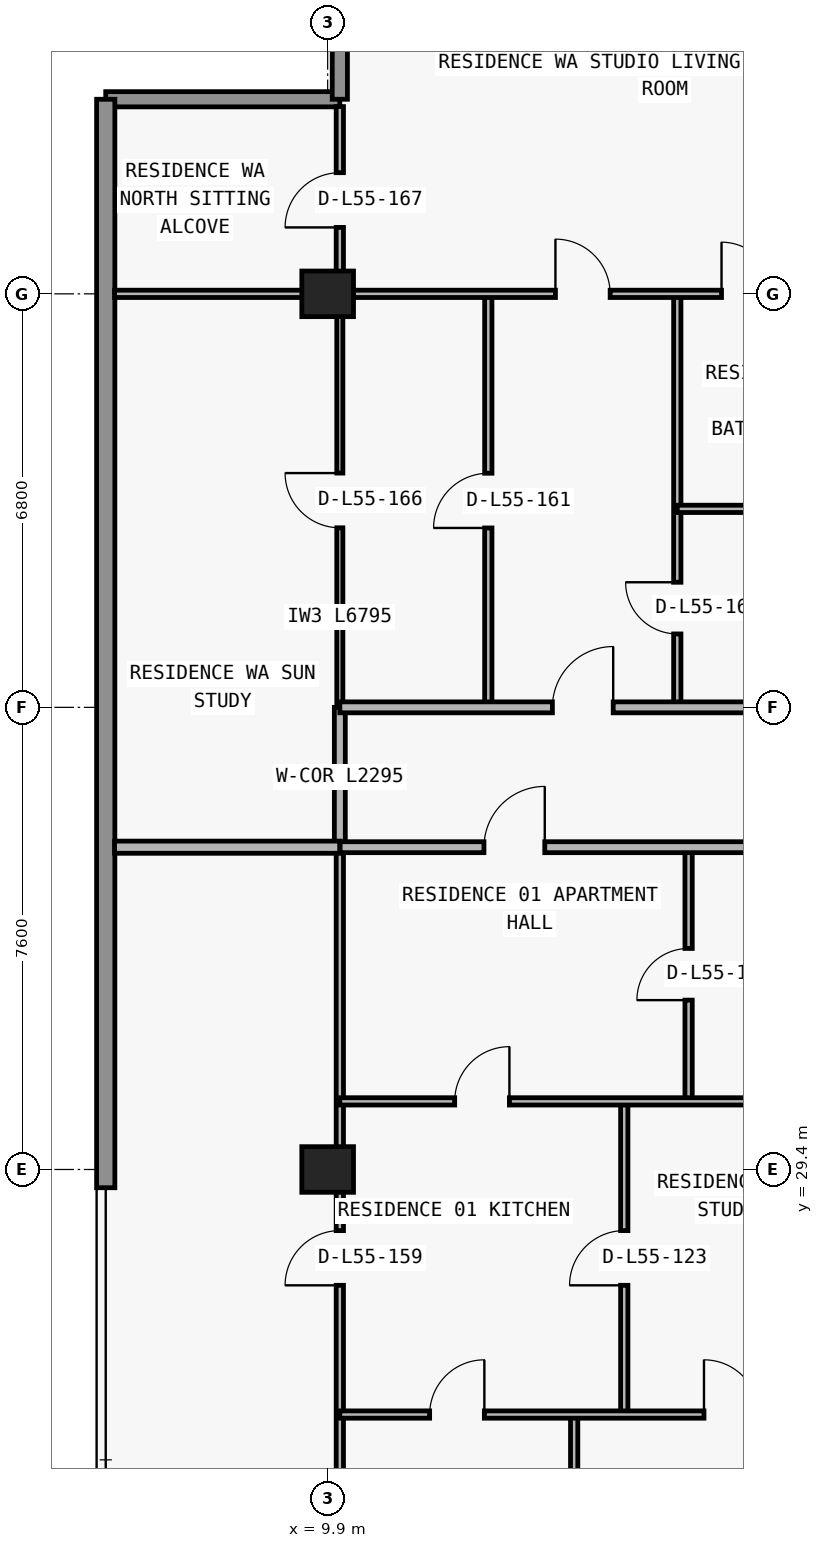
"""IFC4 building model, lengths in metres.
Left out: names, types, materials, properties, quantities, classifications, styles, units other than length and angle.
Written with IfcOpenShell. Run it as: python <this file> out.ifc"""

import sys

from ifc_helpers import new_model, si_unit, direction, frame, frame_2d, origin, origin_2d, place, context, subcontext, project, spatial, rectangle, extrude, element, fill, save


model = new_model("IFC4")
c1 = context("Model", 3, precision=1e-05, world=origin(), true_north=direction((0.0, 1.0)))
c2 = subcontext(c1, "Body", "Model", "MODEL_VIEW")
j1 = project(units=[si_unit("LENGTHUNIT", "METRE"), si_unit("PLANEANGLEUNIT", "RADIAN")], contexts=[c1])
p1 = place(None, origin())
s1 = spatial("IfcSite", under=j1, at=p1, CompositionType="ELEMENT")
p2 = place(p1, origin())
s2 = spatial("IfcBuilding", under=s1, at=p2, CompositionType="ELEMENT")
p3 = place(p2, frame((0.0, 0.0, 198.3)))
s3 = spatial("IfcBuildingStorey", under=s2, at=p3, CompositionType="ELEMENT", Elevation=198.3)
for number, where, z_axis, x_axis in (
    (1, (9.9, 29.4, 0.0), (0.0, 0.0, 1.0), (1.0, 0.0, 0.0)),
    (2, (9.9, 43.8, 0.0), (0.0, 0.0, 1.0), (1.0, 0.0, 0.0)),
):
    element("IfcColumn", number, at=place(p3, frame(where, z_axis=z_axis, x_axis=x_axis)), inside=s3, PredefinedType="COLUMN", context=c2, shape_type="SweptSolid", body=[
        extrude(rectangle(XDim=0.85, YDim=0.75, at=origin_2d()), origin(), (0.0, 0.0, 1.0), 3.05),
    ])
p4 = place(p3, frame((6.25, 47.0, 0.0), z_axis=(0.0, 0.0, 1.0), x_axis=(1.0, 0.0, 0.0)))
e3 = element("IfcWall", 3, at=p4, inside=s3, PredefinedType="ELEMENTEDWALL", context=c2, shape_type="SweptSolid", body=[
    extrude(rectangle(XDim=3.85, YDim=0.25, at=frame_2d((1.925, 0.0))), origin(), (0.0, 0.0, 1.0), 3.05),
])
p5 = place(p3, frame((10.1, 47.0, 0.0), z_axis=(0.0, 0.0, 1.0), x_axis=(0.0, 1.0, 0.0)))
e4 = element("IfcWall", 4, at=p5, inside=s3, PredefinedType="ELEMENTEDWALL", context=c2, shape_type="SweptSolid", body=[
    extrude(rectangle(XDim=3.45, YDim=0.25, at=frame_2d((1.725, 0.0))), origin(), (0.0, 0.0, 1.0), 3.05),
])
p6 = place(p3, frame((6.25, 29.1, 0.0), z_axis=(0.0, 0.0, 1.0), x_axis=(0.0, 1.0, 0.0)))
e5 = element("IfcWall", 5, at=p6, inside=s3, PredefinedType="STANDARD", context=c2, shape_type="SweptSolid", body=[
    extrude(rectangle(XDim=17.9, YDim=0.3, at=frame_2d((8.95, 0.0))), origin(), (0.0, 0.0, 1.0), 3.05),
])
p7 = place(p3, frame((10.1, 11.285, 0.0), z_axis=(0.0, 0.0, 1.0), x_axis=(0.0, 1.0, 0.0)))
e6 = element("IfcWall", 6, at=p7, inside=s3, PredefinedType="PARTITIONING", context=c2, shape_type="SweptSolid", body=[
    extrude(rectangle(XDim=23.415, YDim=0.12, at=frame_2d((11.708, 0.0))), origin(), (0.0, 0.0, 1.0), 2.263),
])
p8 = place(p7, frame((16.21, 0.0, 0.0)))
e7 = element("IfcOpeningElement", 7, at=p8, cuts=e6, PredefinedType="OPENING", context=c2, shape_type="SweptSolid", body=[
    extrude(rectangle(XDim=0.9, YDim=2.15, at=frame_2d((0.45, 1.075))), frame((0.0, 0.07, 0.0), z_axis=(0.0, -1.0, 0.0), x_axis=(1.0, 0.0, 0.0)), (0.0, 0.0, 1.0), 0.14),
])
p9 = place(p3, frame((10.1, 34.705, 0.0), z_axis=(0.0, 0.0, 1.0), x_axis=(0.0, 1.0, 0.0)))
e8 = element("IfcWall", 8, at=p9, inside=s3, PredefinedType="PARTITIONING", context=c2, shape_type="SweptSolid", body=[
    extrude(rectangle(XDim=2.295, YDim=0.18, at=frame_2d((1.147, 0.0))), origin(), (0.0, 0.0, 1.0), 2.263),
])
p10 = place(p3, frame((10.1, 37.005, 0.0), z_axis=(0.0, 0.0, 1.0), x_axis=(0.0, 1.0, 0.0)))
e9 = element("IfcWall", 9, at=p10, inside=s3, PredefinedType="MOVABLE", context=c2, shape_type="SweptSolid", body=[
    extrude(rectangle(XDim=6.795, YDim=0.1, at=frame_2d((3.397, 0.0))), origin(), (0.0, 0.0, 1.0), 2.263),
])
p11 = place(p10, frame((2.948, 0.0, 0.0)))
e10 = element("IfcOpeningElement", 10, at=p11, cuts=e9, PredefinedType="OPENING", context=c2, shape_type="SweptSolid", body=[
    extrude(rectangle(XDim=0.9, YDim=2.15, at=frame_2d((0.45, 1.075))), frame((0.0, 0.06, 0.0), z_axis=(0.0, -1.0, 0.0), x_axis=(1.0, 0.0, 0.0)), (0.0, 0.0, 1.0), 0.12),
])
p12 = place(p3, frame((10.1, 43.805, 0.0), z_axis=(0.0, 0.0, 1.0), x_axis=(0.0, 1.0, 0.0)))
e11 = element("IfcWall", 11, at=p12, inside=s3, PredefinedType="PARTITIONING", context=c2, shape_type="SweptSolid", body=[
    extrude(rectangle(XDim=3.075, YDim=0.12, at=frame_2d((1.538, 0.0))), origin(), (0.0, 0.0, 1.0), 3.05),
])
p13 = place(p12, frame((1.087, 0.0, 0.0)))
e12 = element("IfcOpeningElement", 12, at=p13, cuts=e11, PredefinedType="OPENING", context=c2, shape_type="SweptSolid", body=[
    extrude(rectangle(XDim=0.9, YDim=2.15, at=frame_2d((0.45, 1.075))), frame((0.0, 0.07, 0.0), z_axis=(0.0, -1.0, 0.0), x_axis=(1.0, 0.0, 0.0)), (0.0, 0.0, 1.0), 0.14),
])
p14 = place(p3, frame((12.542, 37.0, 0.0), z_axis=(0.0, 0.0, 1.0), x_axis=(0.0, 1.0, 0.0)))
e13 = element("IfcWall", 13, at=p14, inside=s3, PredefinedType="PARTITIONING", context=c2, shape_type="SweptSolid", body=[
    extrude(rectangle(XDim=6.8, YDim=0.12, at=frame_2d((3.4, 0.0))), origin(), (0.0, 0.0, 1.0), 3.05),
])
p15 = place(p14, frame((2.95, 0.0, 0.0)))
e14 = element("IfcOpeningElement", 14, at=p15, cuts=e13, PredefinedType="OPENING", context=c2, shape_type="SweptSolid", body=[
    extrude(rectangle(XDim=0.9, YDim=2.15, at=frame_2d((0.45, 1.075))), frame((0.0, 0.07, 0.0), z_axis=(0.0, -1.0, 0.0), x_axis=(1.0, 0.0, 0.0)), (0.0, 0.0, 1.0), 0.14),
])
p16 = place(p3, frame((13.954, 11.24, 0.0), z_axis=(0.0, 0.0, 1.0), x_axis=(0.0, 1.0, 0.0)))
e15 = element("IfcWall", 15, at=p16, inside=s3, PredefinedType="PARTITIONING", context=c2, shape_type="SweptSolid", body=[
    extrude(rectangle(XDim=14.13, YDim=0.12, at=frame_2d((7.065, 0.0))), origin(), (0.0, 0.0, 1.0), 2.725),
])
p17 = place(p3, frame((14.778, 25.37, 0.0), z_axis=(0.0, 0.0, 1.0), x_axis=(0.0, 1.0, 0.0)))
e16 = element("IfcWall", 16, at=p17, inside=s3, PredefinedType="PARTITIONING", context=c2, shape_type="SweptSolid", body=[
    extrude(rectangle(XDim=5.15, YDim=0.12, at=frame_2d((2.575, 0.0))), origin(), (0.0, 0.0, 1.0), 3.05),
])
p18 = place(p17, frame((2.125, 0.0, 0.0)))
e17 = element("IfcOpeningElement", 17, at=p18, cuts=e16, PredefinedType="OPENING", context=c2, shape_type="SweptSolid", body=[
    extrude(rectangle(XDim=0.9, YDim=2.15, at=frame_2d((0.45, 1.075))), frame((0.0, 0.07, 0.0), z_axis=(0.0, -1.0, 0.0), x_axis=(1.0, 0.0, 0.0)), (0.0, 0.0, 1.0), 0.14),
])
p19 = place(p3, frame((15.65, 37.0, 0.0), z_axis=(0.0, 0.0, 1.0), x_axis=(0.0, 1.0, 0.0)))
e18 = element("IfcWall", 18, at=p19, inside=s3, PredefinedType="PARTITIONING", context=c2, shape_type="SweptSolid", body=[
    extrude(rectangle(XDim=6.8, YDim=0.12, at=frame_2d((3.4, 0.0))), origin(), (0.0, 0.0, 1.0), 3.05),
])
p20 = place(p19, frame((1.207, 0.0, 0.0)))
e19 = element("IfcOpeningElement", 19, at=p20, cuts=e18, PredefinedType="OPENING", context=c2, shape_type="SweptSolid", body=[
    extrude(rectangle(XDim=0.85, YDim=2.1, at=frame_2d((0.425, 1.05))), frame((0.0, 0.07, 0.0), z_axis=(0.0, -1.0, 0.0), x_axis=(1.0, 0.0, 0.0)), (0.0, 0.0, 1.0), 0.14),
])
p21 = place(p3, frame((15.836, 30.52, 0.0), z_axis=(0.0, 0.0, 1.0), x_axis=(0.0, 1.0, 0.0)))
e20 = element("IfcWall", 20, at=p21, inside=s3, PredefinedType="PARTITIONING", context=c2, shape_type="SweptSolid", body=[
    extrude(rectangle(XDim=4.18, YDim=0.12, at=frame_2d((2.09, 0.0))), origin(), (0.0, 0.0, 1.0), 3.05),
])
p22 = place(p21, frame((1.665, 0.0, 0.0)))
e21 = element("IfcOpeningElement", 21, at=p22, cuts=e20, PredefinedType="OPENING", context=c2, shape_type="SweptSolid", body=[
    extrude(rectangle(XDim=0.85, YDim=2.1, at=frame_2d((0.425, 1.05))), frame((0.0, 0.07, 0.0), z_axis=(0.0, -1.0, 0.0), x_axis=(1.0, 0.0, 0.0)), (0.0, 0.0, 1.0), 0.14),
])
p23 = place(p3, frame((10.1, 25.37, 0.0), z_axis=(0.0, 0.0, 1.0), x_axis=(1.0, 0.0, 0.0)))
e22 = element("IfcWall", 22, at=p23, inside=s3, PredefinedType="PARTITIONING", context=c2, shape_type="SweptSolid", body=[
    extrude(rectangle(XDim=8.2, YDim=0.12, at=frame_2d((4.1, 0.0))), origin(), (0.0, 0.0, 1.0), 3.05),
])
p24 = place(p23, frame((1.477, 0.0, 0.0)))
e23 = element("IfcOpeningElement", 23, at=p24, cuts=e22, PredefinedType="OPENING", context=c2, shape_type="SweptSolid", body=[
    extrude(rectangle(XDim=0.9, YDim=2.15, at=frame_2d((0.45, 1.075))), frame((0.0, 0.07, 0.0), z_axis=(0.0, -1.0, 0.0), x_axis=(1.0, 0.0, 0.0)), (0.0, 0.0, 1.0), 0.14),
])
p25 = place(p23, frame((5.989, 0.0, 0.0)))
e24 = element("IfcOpeningElement", 24, at=p25, cuts=e22, PredefinedType="OPENING", context=c2, shape_type="SweptSolid", body=[
    extrude(rectangle(XDim=0.9, YDim=2.15, at=frame_2d((0.45, 1.075))), frame((0.0, 0.07, 0.0), z_axis=(0.0, -1.0, 0.0), x_axis=(1.0, 0.0, 0.0)), (0.0, 0.0, 1.0), 0.14),
])
p26 = place(p3, frame((10.1, 30.52, 0.0), z_axis=(0.0, 0.0, 1.0), x_axis=(1.0, 0.0, 0.0)))
e25 = element("IfcWall", 25, at=p26, inside=s3, PredefinedType="PARTITIONING", context=c2, shape_type="SweptSolid", body=[
    extrude(rectangle(XDim=8.2, YDim=0.12, at=frame_2d((4.1, 0.0))), origin(), (0.0, 0.0, 1.0), 3.05),
])
p27 = place(p26, frame((1.889, 0.0, 0.0)))
e26 = element("IfcOpeningElement", 26, at=p27, cuts=e25, PredefinedType="OPENING", context=c2, shape_type="SweptSolid", body=[
    extrude(rectangle(XDim=0.9, YDim=2.15, at=frame_2d((0.45, 1.075))), frame((0.0, 0.07, 0.0), z_axis=(0.0, -1.0, 0.0), x_axis=(1.0, 0.0, 0.0)), (0.0, 0.0, 1.0), 0.14),
])
p28 = place(p3, frame((6.395, 34.7, 0.0), z_axis=(0.0, 0.0, 1.0), x_axis=(1.0, 0.0, 0.0)))
e27 = element("IfcWall", 27, at=p28, inside=s3, PredefinedType="PARTITIONING", context=c2, shape_type="SweptSolid", body=[
    extrude(rectangle(XDim=3.705, YDim=0.2, at=frame_2d((1.853, 0.0))), origin(), (0.0, 0.0, 1.0), 3.05),
])
p29 = place(p3, frame((10.105, 34.7, 0.0), z_axis=(0.0, 0.0, 1.0), x_axis=(1.0, 0.0, 0.0)))
e28 = element("IfcWall", 28, at=p29, inside=s3, PredefinedType="PARTITIONING", context=c2, shape_type="SweptSolid", body=[
    extrude(rectangle(XDim=57.595, YDim=0.18, at=frame_2d((28.797, 0.0))), origin(), (0.0, 0.0, 1.0), 3.05),
])
p30 = place(p29, frame((2.365, 0.0, 0.0)))
e29 = element("IfcOpeningElement", 29, at=p30, cuts=e28, PredefinedType="OPENING", context=c2, shape_type="SweptSolid", body=[
    extrude(rectangle(XDim=1.0, YDim=2.2, at=frame_2d((0.5, 1.1))), frame((0.0, 0.1, 0.0), z_axis=(0.0, -1.0, 0.0), x_axis=(1.0, 0.0, 0.0)), (0.0, 0.0, 1.0), 0.2),
])
p31 = place(p29, frame((10.833, 0.0, 0.0)))
e30 = element("IfcOpeningElement", 30, at=p31, cuts=e28, PredefinedType="OPENING", context=c2, shape_type="SweptSolid", body=[
    extrude(rectangle(XDim=1.0, YDim=2.2, at=frame_2d((0.5, 1.1))), frame((0.0, 0.1, 0.0), z_axis=(0.0, -1.0, 0.0), x_axis=(1.0, 0.0, 0.0)), (0.0, 0.0, 1.0), 0.2),
])
p32 = place(p29, frame((19.422, 0.0, 0.0)))
e31 = element("IfcOpeningElement", 31, at=p32, cuts=e28, PredefinedType="OPENING", context=c2, shape_type="SweptSolid", body=[
    extrude(rectangle(XDim=1.0, YDim=2.2, at=frame_2d((0.5, 1.1))), frame((0.0, 0.1, 0.0), z_axis=(0.0, -1.0, 0.0), x_axis=(1.0, 0.0, 0.0)), (0.0, 0.0, 1.0), 0.2),
])
p33 = place(p29, frame((43.865, 0.0, 0.0)))
e32 = element("IfcOpeningElement", 32, at=p33, cuts=e28, PredefinedType="OPENING", context=c2, shape_type="SweptSolid", body=[
    extrude(rectangle(XDim=1.0, YDim=2.2, at=frame_2d((0.5, 1.1))), frame((0.0, 0.1, 0.0), z_axis=(0.0, -1.0, 0.0), x_axis=(1.0, 0.0, 0.0)), (0.0, 0.0, 1.0), 0.2),
])
p34 = place(p3, frame((10.1, 37.0, 0.0), z_axis=(0.0, 0.0, 1.0), x_axis=(1.0, 0.0, 0.0)))
e33 = element("IfcWall", 33, at=p34, inside=s3, PredefinedType="PARTITIONING", context=c2, shape_type="SweptSolid", body=[
    extrude(rectangle(XDim=7.845, YDim=0.18, at=frame_2d((3.922, 0.0))), origin(), (0.0, 0.0, 1.0), 3.05),
])
p35 = place(p34, frame((3.496, 0.0, 0.0)))
e34 = element("IfcOpeningElement", 34, at=p35, cuts=e33, PredefinedType="OPENING", context=c2, shape_type="SweptSolid", body=[
    extrude(rectangle(XDim=1.0, YDim=2.2, at=frame_2d((0.5, 1.1))), frame((0.0, 0.1, 0.0), z_axis=(0.0, -1.0, 0.0), x_axis=(1.0, 0.0, 0.0)), (0.0, 0.0, 1.0), 0.2),
])
p36 = place(p3, frame((15.65, 40.264, 0.0), z_axis=(0.0, 0.0, 1.0), x_axis=(1.0, 0.0, 0.0)))
e35 = element("IfcWall", 35, at=p36, inside=s3, PredefinedType="PARTITIONING", context=c2, shape_type="SweptSolid", body=[
    extrude(rectangle(XDim=2.305, YDim=0.12, at=frame_2d((1.153, 0.0))), origin(), (0.0, 0.0, 1.0), 3.05),
])
p37 = place(p3, frame((6.395, 43.8, 0.0), z_axis=(0.0, 0.0, 1.0), x_axis=(1.0, 0.0, 0.0)))
e36 = element("IfcWall", 36, at=p37, inside=s3, PredefinedType="PARTITIONING", context=c2, shape_type="SweptSolid", body=[
    extrude(rectangle(XDim=11.56, YDim=0.12, at=frame_2d((5.78, 0.0))), origin(), (0.0, 0.0, 1.0), 2.418),
])
p38 = place(p37, frame((7.251, 0.0, 0.0)))
e37 = element("IfcOpeningElement", 37, at=p38, cuts=e36, PredefinedType="OPENING", context=c2, shape_type="SweptSolid", body=[
    extrude(rectangle(XDim=0.9, YDim=2.15, at=frame_2d((0.45, 1.075))), frame((0.0, 0.07, 0.0), z_axis=(0.0, -1.0, 0.0), x_axis=(1.0, 0.0, 0.0)), (0.0, 0.0, 1.0), 0.14),
])
p39 = place(p37, frame((9.982, 0.0, 0.0)))
e38 = element("IfcOpeningElement", 38, at=p39, cuts=e36, PredefinedType="OPENING", context=c2, shape_type="SweptSolid", body=[
    extrude(rectangle(XDim=0.85, YDim=2.1, at=frame_2d((0.425, 1.05))), frame((0.0, 0.07, 0.0), z_axis=(0.0, -1.0, 0.0), x_axis=(1.0, 0.0, 0.0)), (0.0, 0.0, 1.0), 0.14),
])
p40 = place(p30, origin())
e39 = element("IfcDoor", 39, at=p40, inside=s3, OperationType="SINGLE_SWING_RIGHT", PredefinedType="DOOR", context=c2, shape_type="SweptSolid", body=[
    extrude(rectangle(XDim=1.0, YDim=2.2, at=frame_2d((0.5, 1.1))), frame((0.0, 0.025, 0.0), z_axis=(0.0, -1.0, 0.0), x_axis=(1.0, 0.0, 0.0)), (0.0, 0.0, 1.0), 0.05),
])
fill(e29, e39)
p41 = place(p22, origin())
e40 = element("IfcDoor", 40, at=p41, inside=s3, OperationType="SINGLE_SWING_LEFT", PredefinedType="DOOR", context=c2, shape_type="SweptSolid", body=[
    extrude(rectangle(XDim=0.85, YDim=2.1, at=frame_2d((0.425, 1.05))), frame((0.0, 0.025, 0.0), z_axis=(0.0, -1.0, 0.0), x_axis=(1.0, 0.0, 0.0)), (0.0, 0.0, 1.0), 0.05),
])
fill(e21, e40)
p42 = place(p27, origin())
e41 = element("IfcDoor", 41, at=p42, inside=s3, OperationType="SINGLE_SWING_RIGHT", PredefinedType="DOOR", context=c2, shape_type="SweptSolid", body=[
    extrude(rectangle(XDim=0.9, YDim=2.15, at=frame_2d((0.45, 1.075))), frame((0.0, 0.025, 0.0), z_axis=(0.0, -1.0, 0.0), x_axis=(1.0, 0.0, 0.0)), (0.0, 0.0, 1.0), 0.05),
])
fill(e26, e41)
p43 = place(p18, origin())
e42 = element("IfcDoor", 42, at=p43, inside=s3, OperationType="SINGLE_SWING_LEFT", PredefinedType="DOOR", context=c2, shape_type="SweptSolid", body=[
    extrude(rectangle(XDim=0.9, YDim=2.15, at=frame_2d((0.45, 1.075))), frame((0.0, 0.025, 0.0), z_axis=(0.0, -1.0, 0.0), x_axis=(1.0, 0.0, 0.0)), (0.0, 0.0, 1.0), 0.05),
])
fill(e17, e42)
p44 = place(p24, origin())
e43 = element("IfcDoor", 43, at=p44, inside=s3, OperationType="SINGLE_SWING_RIGHT", PredefinedType="DOOR", context=c2, shape_type="SweptSolid", body=[
    extrude(rectangle(XDim=0.9, YDim=2.15, at=frame_2d((0.45, 1.075))), frame((0.0, 0.025, 0.0), z_axis=(0.0, -1.0, 0.0), x_axis=(1.0, 0.0, 0.0)), (0.0, 0.0, 1.0), 0.05),
])
fill(e23, e43)
p45 = place(p25, origin())
e44 = element("IfcDoor", 44, at=p45, inside=s3, OperationType="SINGLE_SWING_LEFT", PredefinedType="DOOR", context=c2, shape_type="SweptSolid", body=[
    extrude(rectangle(XDim=0.9, YDim=2.15, at=frame_2d((0.45, 1.075))), frame((0.0, 0.025, 0.0), z_axis=(0.0, -1.0, 0.0), x_axis=(1.0, 0.0, 0.0)), (0.0, 0.0, 1.0), 0.05),
])
fill(e24, e44)
p46 = place(p8, origin())
e45 = element("IfcDoor", 45, at=p46, inside=s3, OperationType="SINGLE_SWING_LEFT", PredefinedType="DOOR", context=c2, shape_type="SweptSolid", body=[
    extrude(rectangle(XDim=0.9, YDim=2.15, at=frame_2d((0.45, 1.075))), frame((0.0, 0.025, 0.0), z_axis=(0.0, -1.0, 0.0), x_axis=(1.0, 0.0, 0.0)), (0.0, 0.0, 1.0), 0.05),
])
fill(e7, e45)
p47 = place(p15, origin())
e46 = element("IfcDoor", 46, at=p47, inside=s3, OperationType="SINGLE_SWING_LEFT", PredefinedType="DOOR", context=c2, shape_type="SweptSolid", body=[
    extrude(rectangle(XDim=0.9, YDim=2.15, at=frame_2d((0.45, 1.075))), frame((0.0, 0.025, 0.0), z_axis=(0.0, -1.0, 0.0), x_axis=(1.0, 0.0, 0.0)), (0.0, 0.0, 1.0), 0.05),
])
fill(e14, e46)
p48 = place(p35, origin())
e47 = element("IfcDoor", 47, at=p48, inside=s3, OperationType="SINGLE_SWING_RIGHT", PredefinedType="DOOR", context=c2, shape_type="SweptSolid", body=[
    extrude(rectangle(XDim=1.0, YDim=2.2, at=frame_2d((0.5, 1.1))), frame((0.0, 0.025, 0.0), z_axis=(0.0, -1.0, 0.0), x_axis=(1.0, 0.0, 0.0)), (0.0, 0.0, 1.0), 0.05),
])
fill(e34, e47)
p49 = place(p38, origin())
e48 = element("IfcDoor", 48, at=p49, inside=s3, OperationType="SINGLE_SWING_LEFT", PredefinedType="DOOR", context=c2, shape_type="SweptSolid", body=[
    extrude(rectangle(XDim=0.9, YDim=2.15, at=frame_2d((0.45, 1.075))), frame((0.0, 0.025, 0.0), z_axis=(0.0, -1.0, 0.0), x_axis=(1.0, 0.0, 0.0)), (0.0, 0.0, 1.0), 0.05),
])
fill(e37, e48)
p50 = place(p20, origin())
e49 = element("IfcDoor", 49, at=p50, inside=s3, OperationType="SINGLE_SWING_RIGHT", PredefinedType="DOOR", context=c2, shape_type="SweptSolid", body=[
    extrude(rectangle(XDim=0.85, YDim=2.1, at=frame_2d((0.425, 1.05))), frame((0.0, 0.025, 0.0), z_axis=(0.0, -1.0, 0.0), x_axis=(1.0, 0.0, 0.0)), (0.0, 0.0, 1.0), 0.05),
])
fill(e19, e49)
p51 = place(p39, origin())
e50 = element("IfcDoor", 50, at=p51, inside=s3, OperationType="SINGLE_SWING_LEFT", PredefinedType="DOOR", context=c2, shape_type="SweptSolid", body=[
    extrude(rectangle(XDim=0.85, YDim=2.1, at=frame_2d((0.425, 1.05))), frame((0.0, 0.025, 0.0), z_axis=(0.0, -1.0, 0.0), x_axis=(1.0, 0.0, 0.0)), (0.0, 0.0, 1.0), 0.05),
])
fill(e38, e50)
p52 = place(p11, origin())
e51 = element("IfcDoor", 51, at=p52, inside=s3, OperationType="SINGLE_SWING_RIGHT", PredefinedType="DOOR", context=c2, shape_type="SweptSolid", body=[
    extrude(rectangle(XDim=0.9, YDim=2.15, at=frame_2d((0.45, 1.075))), frame((0.0, 0.025, 0.0), z_axis=(0.0, -1.0, 0.0), x_axis=(1.0, 0.0, 0.0)), (0.0, 0.0, 1.0), 0.05),
])
fill(e10, e51)
p53 = place(p13, origin())
e52 = element("IfcDoor", 52, at=p53, inside=s3, OperationType="SINGLE_SWING_LEFT", PredefinedType="DOOR", context=c2, shape_type="SweptSolid", body=[
    extrude(rectangle(XDim=0.9, YDim=2.15, at=frame_2d((0.45, 1.075))), frame((0.0, 0.025, 0.0), z_axis=(0.0, -1.0, 0.0), x_axis=(1.0, 0.0, 0.0)), (0.0, 0.0, 1.0), 0.05),
])
fill(e12, e52)
save(model, sys.argv[1])
